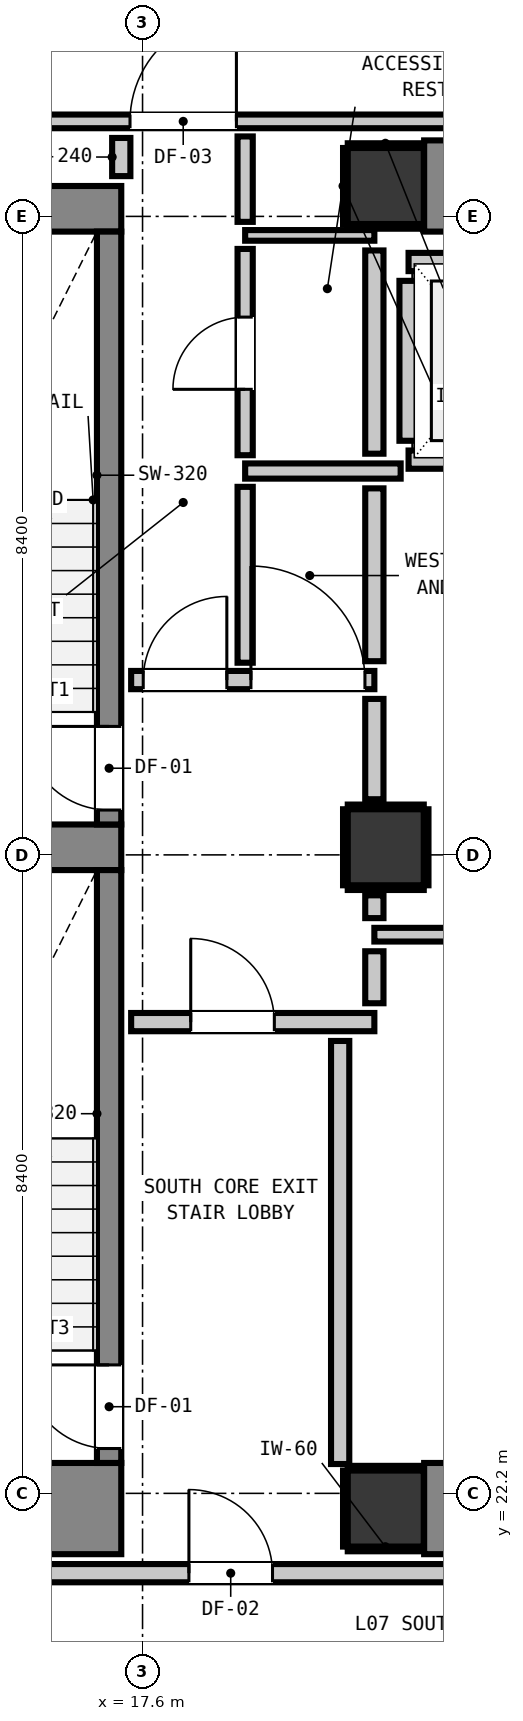
"""IFC4 building model, lengths in metres.
Left out: names, types, materials, properties, quantities, classifications, styles, units other than length and angle.
Written with IfcOpenShell. Run it as: python <this file> out.ifc"""

import sys

from ifc_helpers import new_model, si_unit, direction, frame, frame_2d, origin, origin_2d, place, context, subcontext, project, spatial, rectangle, extrude, element, fill, save


model = new_model("IFC4")
c1 = context("Model", 3, precision=1e-05, world=origin(), true_north=direction((0.0, 1.0)))
c2 = subcontext(c1, "Body", "Model", "MODEL_VIEW")
j1 = project(units=[si_unit("LENGTHUNIT", "METRE"), si_unit("PLANEANGLEUNIT", "RADIAN")], contexts=[c1])
p1 = place(None, origin())
s1 = spatial("IfcSite", under=j1, at=p1, CompositionType="ELEMENT")
p2 = place(p1, origin())
s2 = spatial("IfcBuilding", under=s1, at=p2, CompositionType="ELEMENT")
p3 = place(p2, frame((0.0, 0.0, 28.64)))
s3 = spatial("IfcBuildingStorey", under=s2, at=p3, CompositionType="ELEMENT", Elevation=28.64)
for number, where, z_axis, x_axis in (
    (1, (20.8, 22.0, 0.0), (0.0, 0.0, 1.0), (1.0, 0.0, 0.0)),
    (2, (20.8, 39.4, 0.0), (0.0, 0.0, 1.0), (1.0, 0.0, 0.0)),
):
    element("IfcColumn", number, at=place(p3, frame(where, z_axis=z_axis, x_axis=x_axis)), inside=s3, PredefinedType="COLUMN", context=c2, shape_type="SweptSolid", body=[
        extrude(rectangle(XDim=1.0, YDim=1.0, at=origin_2d()), origin(), (0.0, 0.0, 1.0), 3.32),
    ])
p4 = place(p3, frame((13.24, 22.0, 0.0), z_axis=(0.0, 0.0, 1.0), x_axis=(1.0, 0.0, 0.0)))
e3 = element("IfcWall", 3, at=p4, inside=s3, PredefinedType="SHEAR", context=c2, shape_type="SweptSolid", body=[
    extrude(rectangle(XDim=4.08, YDim=1.2, at=frame_2d((2.04, 0.0))), origin(), (0.0, 0.0, 1.0), 3.32),
])
p5 = place(p3, frame((13.24, 39.1, 0.0), z_axis=(0.0, 0.0, 1.0), x_axis=(1.0, 0.0, 0.0)))
e4 = element("IfcWall", 4, at=p5, inside=s3, PredefinedType="SHEAR", context=c2, shape_type="SweptSolid", body=[
    extrude(rectangle(XDim=4.08, YDim=0.6, at=frame_2d((2.04, 0.0))), origin(), (0.0, 0.0, 1.0), 3.32),
])
p6 = place(p3, frame((13.905, 30.7, 0.0), z_axis=(0.0, 0.0, 1.0), x_axis=(1.0, 0.0, 0.0)))
e5 = element("IfcWall", 5, at=p6, inside=s3, PredefinedType="SHEAR", context=c2, shape_type="SweptSolid", body=[
    extrude(rectangle(XDim=3.415, YDim=0.6, at=frame_2d((1.708, 0.0))), origin(), (0.0, 0.0, 1.0), 3.32),
])
for number, where, z_axis, x_axis in (
    (6, (21.305, 22.0, 0.0), (0.0, 0.0, 1.0), (1.0, 0.0, 0.0)),
    (7, (21.305, 39.4, 0.0), (0.0, 0.0, 1.0), (1.0, 0.0, 0.0)),
):
    element("IfcWall", number, at=place(p3, frame(where, z_axis=z_axis, x_axis=x_axis)), inside=s3, PredefinedType="SHEAR", context=c2, shape_type="SweptSolid", body=[
        extrude(rectangle(XDim=7.39, YDim=1.2, at=frame_2d((3.695, 0.0))), origin(), (0.0, 0.0, 1.0), 3.32),
    ])
p7 = place(p3, frame((17.16, 31.0, 0.0), z_axis=(0.0, 0.0, 1.0), x_axis=(0.0, 1.0, 0.0)))
e8 = element("IfcWall", 8, at=p7, inside=s3, PredefinedType="SHEAR", context=c2, shape_type="SweptSolid", body=[
    extrude(rectangle(XDim=7.8, YDim=0.32, at=frame_2d((3.9, 0.0))), origin(), (0.0, 0.0, 1.0), 3.32),
])
p8 = place(p7, frame((0.19, 0.0, 0.0)))
e9 = element("IfcOpeningElement", 9, at=p8, cuts=e8, PredefinedType="OPENING", context=c2, shape_type="SweptSolid", body=[
    extrude(rectangle(XDim=1.1, YDim=2.15, at=frame_2d((0.55, 1.075))), frame((0.0, 0.17, 0.0), z_axis=(0.0, -1.0, 0.0), x_axis=(1.0, 0.0, 0.0)), (0.0, 0.0, 1.0), 0.34),
])
p9 = place(p3, frame((17.16, 22.6, 0.0), z_axis=(0.0, 0.0, 1.0), x_axis=(0.0, 1.0, 0.0)))
e10 = element("IfcWall", 10, at=p9, inside=s3, PredefinedType="SHEAR", context=c2, shape_type="SweptSolid", body=[
    extrude(rectangle(XDim=7.8, YDim=0.32, at=frame_2d((3.9, 0.0))), origin(), (0.0, 0.0, 1.0), 3.32),
])
p10 = place(p9, frame((0.19, 0.0, 0.0)))
e11 = element("IfcOpeningElement", 11, at=p10, cuts=e10, PredefinedType="OPENING", context=c2, shape_type="SweptSolid", body=[
    extrude(rectangle(XDim=1.1, YDim=2.15, at=frame_2d((0.55, 1.075))), frame((0.0, 0.17, 0.0), z_axis=(0.0, -1.0, 0.0), x_axis=(1.0, 0.0, 0.0)), (0.0, 0.0, 1.0), 0.34),
])
p11 = place(p3, frame((20.8, 30.7, 0.0), z_axis=(0.0, 0.0, 1.0), x_axis=(1.0, 0.0, 0.0)))
e12 = element("IfcColumn", 12, at=p11, inside=s3, PredefinedType="COLUMN", context=c2, shape_type="SweptSolid", body=[
    extrude(rectangle(XDim=1.0, YDim=1.0, at=origin_2d()), origin(), (0.0, 0.0, 1.0), 3.32),
])
for number, where, z_axis, x_axis in (
    (13, (21.1, 35.8, 0.0), (0.0, 0.0, 1.0), (1.0, 0.0, 0.0)),
    (14, (21.1, 38.4, 0.0), (0.0, 0.0, 1.0), (1.0, 0.0, 0.0)),
):
    element("IfcWall", number, at=place(p3, frame(where, z_axis=z_axis, x_axis=x_axis)), inside=s3, PredefinedType="PARTITIONING", context=c2, shape_type="SweptSolid", body=[
        extrude(rectangle(XDim=2.2, YDim=0.24, at=frame_2d((1.1, 0.0))), origin(), (0.0, 0.0, 1.0), 3.06),
    ])
p12 = place(p3, frame((21.1, 36.048, 0.0), z_axis=(0.0, 0.0, 1.0), x_axis=(0.0, 1.0, 0.0)))
e15 = element("IfcWall", 15, at=p12, inside=s3, PredefinedType="PARTITIONING", context=c2, shape_type="SweptSolid", body=[
    extrude(rectangle(XDim=2.104, YDim=0.24, at=frame_2d((1.052, 0.0))), origin(), (0.0, 0.0, 1.0), 2.295),
])
p13 = place(p3, frame((1.827, 21.15, 0.0), z_axis=(0.0, 0.0, 1.0), x_axis=(1.0, 0.0, 0.0)))
e16 = element("IfcWall", 16, at=p13, inside=s3, PredefinedType="PARTITIONING", context=c2, shape_type="SweptSolid", body=[
    extrude(rectangle(XDim=42.146, YDim=0.24, at=frame_2d((21.073, 0.0))), origin(), (0.0, 0.0, 1.0), 3.06),
])
p14 = place(p13, frame((16.383, 0.0, 0.0)))
e17 = element("IfcOpeningElement", 17, at=p14, cuts=e16, PredefinedType="OPENING", context=c2, shape_type="SweptSolid", body=[
    extrude(rectangle(XDim=1.1, YDim=2.15, at=frame_2d((0.55, 1.075))), frame((0.0, 0.13, 0.0), z_axis=(0.0, -1.0, 0.0), x_axis=(1.0, 0.0, 0.0)), (0.0, 0.0, 1.0), 0.26),
])
p15 = place(p13, frame((8.647, 0.0, 0.0)))
e18 = element("IfcOpeningElement", 18, at=p15, cuts=e16, PredefinedType="OPENING", context=c2, shape_type="SweptSolid", body=[
    extrude(rectangle(XDim=1.4, YDim=2.15, at=frame_2d((0.7, 1.075))), frame((0.0, 0.13, 0.0), z_axis=(0.0, -1.0, 0.0), x_axis=(1.0, 0.0, 0.0)), (0.0, 0.0, 1.0), 0.26),
])
p16 = place(p13, frame((38.574, 0.0, 0.0)))
e19 = element("IfcOpeningElement", 19, at=p16, cuts=e16, PredefinedType="OPENING", context=c2, shape_type="SweptSolid", body=[
    extrude(rectangle(XDim=0.9, YDim=2.1, at=frame_2d((0.45, 1.05))), frame((0.0, 0.13, 0.0), z_axis=(0.0, -1.0, 0.0), x_axis=(1.0, 0.0, 0.0)), (0.0, 0.0, 1.0), 0.26),
])
p17 = place(p3, frame((17.45, 28.4, 0.0), z_axis=(0.0, 0.0, 1.0), x_axis=(1.0, 0.0, 0.0)))
e20 = element("IfcWall", 20, at=p17, inside=s3, PredefinedType="PARTITIONING", context=c2, shape_type="SweptSolid", body=[
    extrude(rectangle(XDim=3.2, YDim=0.24, at=frame_2d((1.6, 0.0))), origin(), (0.0, 0.0, 1.0), 3.06),
])
p18 = place(p17, frame((0.784, 0.0, 0.0)))
e21 = element("IfcOpeningElement", 21, at=p18, cuts=e20, PredefinedType="OPENING", context=c2, shape_type="SweptSolid", body=[
    extrude(rectangle(XDim=1.1, YDim=2.15, at=frame_2d((0.55, 1.075))), frame((0.0, 0.13, 0.0), z_axis=(0.0, -1.0, 0.0), x_axis=(1.0, 0.0, 0.0)), (0.0, 0.0, 1.0), 0.26),
])
p19 = place(p3, frame((17.45, 32.9, 0.0), z_axis=(0.0, 0.0, 1.0), x_axis=(1.0, 0.0, 0.0)))
e22 = element("IfcWall", 22, at=p19, inside=s3, PredefinedType="PARTITIONING", context=c2, shape_type="SweptSolid", body=[
    extrude(rectangle(XDim=3.2, YDim=0.24, at=frame_2d((1.6, 0.0))), origin(), (0.0, 0.0, 1.0), 3.06),
])
p20 = place(p19, frame((0.159, 0.0, 0.0)))
e23 = element("IfcOpeningElement", 23, at=p20, cuts=e22, PredefinedType="OPENING", context=c2, shape_type="SweptSolid", body=[
    extrude(rectangle(XDim=1.1, YDim=2.15, at=frame_2d((0.55, 1.075))), frame((0.0, 0.13, 0.0), z_axis=(0.0, -1.0, 0.0), x_axis=(1.0, 0.0, 0.0)), (0.0, 0.0, 1.0), 0.26),
])
p21 = place(p19, frame((1.576, 0.0, 0.0)))
e24 = element("IfcOpeningElement", 24, at=p21, cuts=e22, PredefinedType="OPENING", context=c2, shape_type="SweptSolid", body=[
    extrude(rectangle(XDim=1.5, YDim=2.15, at=frame_2d((0.75, 1.075))), frame((0.0, 0.13, 0.0), z_axis=(0.0, -1.0, 0.0), x_axis=(1.0, 0.0, 0.0)), (0.0, 0.0, 1.0), 0.26),
])
p22 = place(p3, frame((18.95, 35.65, 0.0), z_axis=(0.0, 0.0, 1.0), x_axis=(1.0, 0.0, 0.0)))
e25 = element("IfcWall", 25, at=p22, inside=s3, PredefinedType="PARTITIONING", context=c2, shape_type="SweptSolid", body=[
    extrude(rectangle(XDim=2.046, YDim=0.2, at=frame_2d((1.023, 0.0))), origin(), (0.0, 0.0, 1.0), 3.06),
])
p23 = place(p3, frame((20.65, 29.55, 0.0), z_axis=(0.0, 0.0, 1.0), x_axis=(1.0, 0.0, 0.0)))
e26 = element("IfcWall", 26, at=p23, inside=s3, PredefinedType="PARTITIONING", context=c2, shape_type="SweptSolid", body=[
    extrude(rectangle(XDim=9.325, YDim=0.18, at=frame_2d((4.663, 0.0))), origin(), (0.0, 0.0, 1.0), 3.06),
])
p24 = place(p3, frame((12.989, 40.25, 0.0), z_axis=(0.0, 0.0, 1.0), x_axis=(1.0, 0.0, 0.0)))
e27 = element("IfcWall", 27, at=p24, inside=s3, PredefinedType="PARTITIONING", context=c2, shape_type="SweptSolid", body=[
    extrude(rectangle(XDim=30.984, YDim=0.18, at=frame_2d((15.492, 0.0))), origin(), (0.0, 0.0, 1.0), 3.06),
])
p25 = place(p24, frame((4.446, 0.0, 0.0)))
e28 = element("IfcOpeningElement", 28, at=p25, cuts=e27, PredefinedType="OPENING", context=c2, shape_type="SweptSolid", body=[
    extrude(rectangle(XDim=1.4, YDim=2.15, at=frame_2d((0.7, 1.075))), frame((0.0, 0.1, 0.0), z_axis=(0.0, -1.0, 0.0), x_axis=(1.0, 0.0, 0.0)), (0.0, 0.0, 1.0), 0.2),
])
p26 = place(p24, frame((27.362, 0.0, 0.0)))
e29 = element("IfcOpeningElement", 29, at=p26, cuts=e27, PredefinedType="OPENING", context=c2, shape_type="SweptSolid", body=[
    extrude(rectangle(XDim=1.0, YDim=2.15, at=frame_2d((0.5, 1.075))), frame((0.0, 0.1, 0.0), z_axis=(0.0, -1.0, 0.0), x_axis=(1.0, 0.0, 0.0)), (0.0, 0.0, 1.0), 0.2),
])
p27 = place(p3, frame((18.95, 38.75, 0.0), z_axis=(0.0, 0.0, 1.0), x_axis=(1.0, 0.0, 0.0)))
e30 = element("IfcWall", 30, at=p27, inside=s3, PredefinedType="PARTITIONING", context=c2, shape_type="SweptSolid", body=[
    extrude(rectangle(XDim=1.7, YDim=0.14, at=frame_2d((0.85, 0.0))), origin(), (0.0, 0.0, 1.0), 3.06),
])
p28 = place(p3, frame((17.32, 39.53, 0.0), z_axis=(0.0, 0.0, 1.0), x_axis=(0.0, 1.0, 0.0)))
e31 = element("IfcWall", 31, at=p28, inside=s3, PredefinedType="PARTITIONING", context=c2, shape_type="SweptSolid", body=[
    extrude(rectangle(XDim=0.502, YDim=0.24, at=frame_2d((0.251, 0.0))), origin(), (0.0, 0.0, 1.0), 3.06),
])
p29 = place(p3, frame((20.2, 22.586, 0.0), z_axis=(0.0, 0.0, 1.0), x_axis=(0.0, 1.0, 0.0)))
e32 = element("IfcWall", 32, at=p29, inside=s3, PredefinedType="PARTITIONING", context=c2, shape_type="SweptSolid", body=[
    extrude(rectangle(XDim=5.566, YDim=0.24, at=frame_2d((2.783, 0.0))), origin(), (0.0, 0.0, 1.0), 3.06),
])
p30 = place(p3, frame((20.65, 28.648, 0.0), z_axis=(0.0, 0.0, 1.0), x_axis=(0.0, 1.0, 0.0)))
e33 = element("IfcWall", 33, at=p30, inside=s3, PredefinedType="PARTITIONING", context=c2, shape_type="SweptSolid", body=[
    extrude(rectangle(XDim=0.684, YDim=0.24, at=frame_2d((0.342, 0.0))), origin(), (0.0, 0.0, 1.0), 2.295),
])
p31 = place(p3, frame((20.65, 29.768, 0.0), z_axis=(0.0, 0.0, 1.0), x_axis=(0.0, 1.0, 0.0)))
e34 = element("IfcWall", 34, at=p31, inside=s3, PredefinedType="PARTITIONING", context=c2, shape_type="SweptSolid", body=[
    extrude(rectangle(XDim=0.3, YDim=0.24, at=frame_2d((0.15, 0.0))), origin(), (0.0, 0.0, 1.0), 2.295),
])
p32 = place(p3, frame((20.65, 31.332, 0.0), z_axis=(0.0, 0.0, 1.0), x_axis=(0.0, 1.0, 0.0)))
e35 = element("IfcWall", 35, at=p32, inside=s3, PredefinedType="PARTITIONING", context=c2, shape_type="SweptSolid", body=[
    extrude(rectangle(XDim=1.32, YDim=0.24, at=frame_2d((0.66, 0.0))), origin(), (0.0, 0.0, 1.0), 2.295),
])
p33 = place(p3, frame((20.65, 33.148, 0.0), z_axis=(0.0, 0.0, 1.0), x_axis=(0.0, 1.0, 0.0)))
e36 = element("IfcWall", 36, at=p33, inside=s3, PredefinedType="PARTITIONING", context=c2, shape_type="SweptSolid", body=[
    extrude(rectangle(XDim=2.274, YDim=0.24, at=frame_2d((1.137, 0.0))), origin(), (0.0, 0.0, 1.0), 2.295),
])
p34 = place(p3, frame((20.65, 35.878, 0.0), z_axis=(0.0, 0.0, 1.0), x_axis=(0.0, 1.0, 0.0)))
e37 = element("IfcWall", 37, at=p34, inside=s3, PredefinedType="PARTITIONING", context=c2, shape_type="SweptSolid", body=[
    extrude(rectangle(XDim=2.674, YDim=0.24, at=frame_2d((1.337, 0.0))), origin(), (0.0, 0.0, 1.0), 2.295),
])
p35 = place(p3, frame((18.95, 33.128, 0.0), z_axis=(0.0, 0.0, 1.0), x_axis=(0.0, 1.0, 0.0)))
e38 = element("IfcWall", 38, at=p35, inside=s3, PredefinedType="PARTITIONING", context=c2, shape_type="SweptSolid", body=[
    extrude(rectangle(XDim=2.314, YDim=0.2, at=frame_2d((1.157, 0.0))), origin(), (0.0, 0.0, 1.0), 3.06),
])
p36 = place(p3, frame((18.95, 35.858, 0.0), z_axis=(0.0, 0.0, 1.0), x_axis=(0.0, 1.0, 0.0)))
e39 = element("IfcWall", 39, at=p36, inside=s3, PredefinedType="PARTITIONING", context=c2, shape_type="SweptSolid", body=[
    extrude(rectangle(XDim=2.714, YDim=0.2, at=frame_2d((1.357, 0.0))), origin(), (0.0, 0.0, 1.0), 3.06),
])
p37 = place(p36, frame((0.867, 0.0, 0.0)))
e40 = element("IfcOpeningElement", 40, at=p37, cuts=e39, PredefinedType="OPENING", context=c2, shape_type="SweptSolid", body=[
    extrude(rectangle(XDim=0.95, YDim=2.1, at=frame_2d((0.475, 1.05))), frame((0.0, 0.11, 0.0), z_axis=(0.0, -1.0, 0.0), x_axis=(1.0, 0.0, 0.0)), (0.0, 0.0, 1.0), 0.22),
])
p38 = place(p3, frame((18.95, 38.928, 0.0), z_axis=(0.0, 0.0, 1.0), x_axis=(0.0, 1.0, 0.0)))
e41 = element("IfcWall", 41, at=p38, inside=s3, PredefinedType="PARTITIONING", context=c2, shape_type="SweptSolid", body=[
    extrude(rectangle(XDim=1.124, YDim=0.2, at=frame_2d((0.562, 0.0))), origin(), (0.0, 0.0, 1.0), 3.06),
])
for number, where, z_axis, x_axis in (
    (42, (20.3, 21.468, 0.0), (0.0, 0.0, 1.0), (1.0, 0.0, 0.0)),
    (43, (20.3, 22.532, 0.0), (0.0, 0.0, 1.0), (1.0, 0.0, 0.0)),
):
    element("IfcWall", number, at=place(p3, frame(where, z_axis=z_axis, x_axis=x_axis)), inside=s3, PredefinedType="PARTITIONING", context=c2, shape_type="SweptSolid", body=[
        extrude(rectangle(XDim=0.99, YDim=0.06, at=frame_2d((0.495, 0.0))), origin(), (0.0, 0.0, 1.0), 1.45),
    ])
p39 = place(p3, frame((20.268, 21.5, 0.0), z_axis=(0.0, 0.0, 1.0), x_axis=(0.0, 1.0, 0.0)))
e44 = element("IfcWall", 44, at=p39, inside=s3, PredefinedType="PARTITIONING", context=c2, shape_type="SweptSolid", body=[
    extrude(rectangle(XDim=1.0, YDim=0.06, at=frame_2d((0.5, 0.0))), origin(), (0.0, 0.0, 1.0), 1.45),
])
for number, where, z_axis, x_axis in (
    (45, (20.3, 38.868, 0.0), (0.0, 0.0, 1.0), (1.0, 0.0, 0.0)),
    (46, (20.3, 39.932, 0.0), (0.0, 0.0, 1.0), (1.0, 0.0, 0.0)),
):
    element("IfcWall", number, at=place(p3, frame(where, z_axis=z_axis, x_axis=x_axis)), inside=s3, PredefinedType="PARTITIONING", context=c2, shape_type="SweptSolid", body=[
        extrude(rectangle(XDim=0.99, YDim=0.06, at=frame_2d((0.495, 0.0))), origin(), (0.0, 0.0, 1.0), 1.45),
    ])
for number, where, z_axis, x_axis in (
    (47, (20.268, 38.9, 0.0), (0.0, 0.0, 1.0), (0.0, 1.0, 0.0)),
    (48, (20.3, 30.168, 0.0), (0.0, 0.0, 1.0), (1.0, 0.0, 0.0)),
    (49, (20.3, 31.232, 0.0), (0.0, 0.0, 1.0), (1.0, 0.0, 0.0)),
    (50, (20.268, 30.2, 0.0), (0.0, 0.0, 1.0), (0.0, 1.0, 0.0)),
    (51, (21.332, 30.2, 0.0), (0.0, 0.0, 1.0), (0.0, 1.0, 0.0)),
):
    element("IfcWall", number, at=place(p3, frame(where, z_axis=z_axis, x_axis=x_axis)), inside=s3, PredefinedType="PARTITIONING", context=c2, shape_type="SweptSolid", body=[
        extrude(rectangle(XDim=1.0, YDim=0.06, at=frame_2d((0.5, 0.0))), origin(), (0.0, 0.0, 1.0), 1.45),
    ])
p40 = place(p8, origin())
e52 = element("IfcDoor", 52, at=p40, inside=s3, OperationType="SINGLE_SWING_RIGHT", PredefinedType="DOOR", context=c2, shape_type="SweptSolid", body=[
    extrude(rectangle(XDim=1.1, YDim=2.15, at=frame_2d((0.55, 1.075))), frame((0.0, 0.025, 0.0), z_axis=(0.0, -1.0, 0.0), x_axis=(1.0, 0.0, 0.0)), (0.0, 0.0, 1.0), 0.05),
])
fill(e9, e52)
p41 = place(p10, origin())
e53 = element("IfcDoor", 53, at=p41, inside=s3, OperationType="SINGLE_SWING_RIGHT", PredefinedType="DOOR", context=c2, shape_type="SweptSolid", body=[
    extrude(rectangle(XDim=1.1, YDim=2.15, at=frame_2d((0.55, 1.075))), frame((0.0, 0.025, 0.0), z_axis=(0.0, -1.0, 0.0), x_axis=(1.0, 0.0, 0.0)), (0.0, 0.0, 1.0), 0.05),
])
fill(e11, e53)
p42 = place(p18, origin())
e54 = element("IfcDoor", 54, at=p42, inside=s3, OperationType="SINGLE_SWING_LEFT", PredefinedType="DOOR", context=c2, shape_type="SweptSolid", body=[
    extrude(rectangle(XDim=1.1, YDim=2.15, at=frame_2d((0.55, 1.075))), frame((0.0, 0.025, 0.0), z_axis=(0.0, -1.0, 0.0), x_axis=(1.0, 0.0, 0.0)), (0.0, 0.0, 1.0), 0.05),
])
fill(e21, e54)
p43 = place(p20, origin())
e55 = element("IfcDoor", 55, at=p43, inside=s3, OperationType="SINGLE_SWING_RIGHT", PredefinedType="DOOR", context=c2, shape_type="SweptSolid", body=[
    extrude(rectangle(XDim=1.1, YDim=2.15, at=frame_2d((0.55, 1.075))), frame((0.0, 0.025, 0.0), z_axis=(0.0, -1.0, 0.0), x_axis=(1.0, 0.0, 0.0)), (0.0, 0.0, 1.0), 0.05),
])
fill(e23, e55)
p44 = place(p14, origin())
e56 = element("IfcDoor", 56, at=p44, inside=s3, OperationType="SINGLE_SWING_LEFT", PredefinedType="DOOR", context=c2, shape_type="SweptSolid", body=[
    extrude(rectangle(XDim=1.1, YDim=2.15, at=frame_2d((0.55, 1.075))), frame((0.0, 0.025, 0.0), z_axis=(0.0, -1.0, 0.0), x_axis=(1.0, 0.0, 0.0)), (0.0, 0.0, 1.0), 0.05),
])
fill(e17, e56)
p45 = place(p25, origin())
e57 = element("IfcDoor", 57, at=p45, inside=s3, OperationType="SINGLE_SWING_RIGHT", PredefinedType="DOOR", context=c2, shape_type="SweptSolid", body=[
    extrude(rectangle(XDim=1.4, YDim=2.15, at=frame_2d((0.7, 1.075))), frame((0.0, 0.025, 0.0), z_axis=(0.0, -1.0, 0.0), x_axis=(1.0, 0.0, 0.0)), (0.0, 0.0, 1.0), 0.05),
])
fill(e28, e57)
p46 = place(p21, origin())
e58 = element("IfcDoor", 58, at=p46, inside=s3, OperationType="SINGLE_SWING_LEFT", PredefinedType="DOOR", context=c2, shape_type="SweptSolid", body=[
    extrude(rectangle(XDim=1.5, YDim=2.15, at=frame_2d((0.75, 1.075))), frame((0.0, 0.025, 0.0), z_axis=(0.0, -1.0, 0.0), x_axis=(1.0, 0.0, 0.0)), (0.0, 0.0, 1.0), 0.05),
])
fill(e24, e58)
p47 = place(p37, origin())
e59 = element("IfcDoor", 59, at=p47, inside=s3, OperationType="SINGLE_SWING_LEFT", PredefinedType="DOOR", context=c2, shape_type="SweptSolid", body=[
    extrude(rectangle(XDim=0.95, YDim=2.1, at=frame_2d((0.475, 1.05))), frame((0.0, 0.025, 0.0), z_axis=(0.0, -1.0, 0.0), x_axis=(1.0, 0.0, 0.0)), (0.0, 0.0, 1.0), 0.05),
])
fill(e40, e59)
save(model, sys.argv[1])
